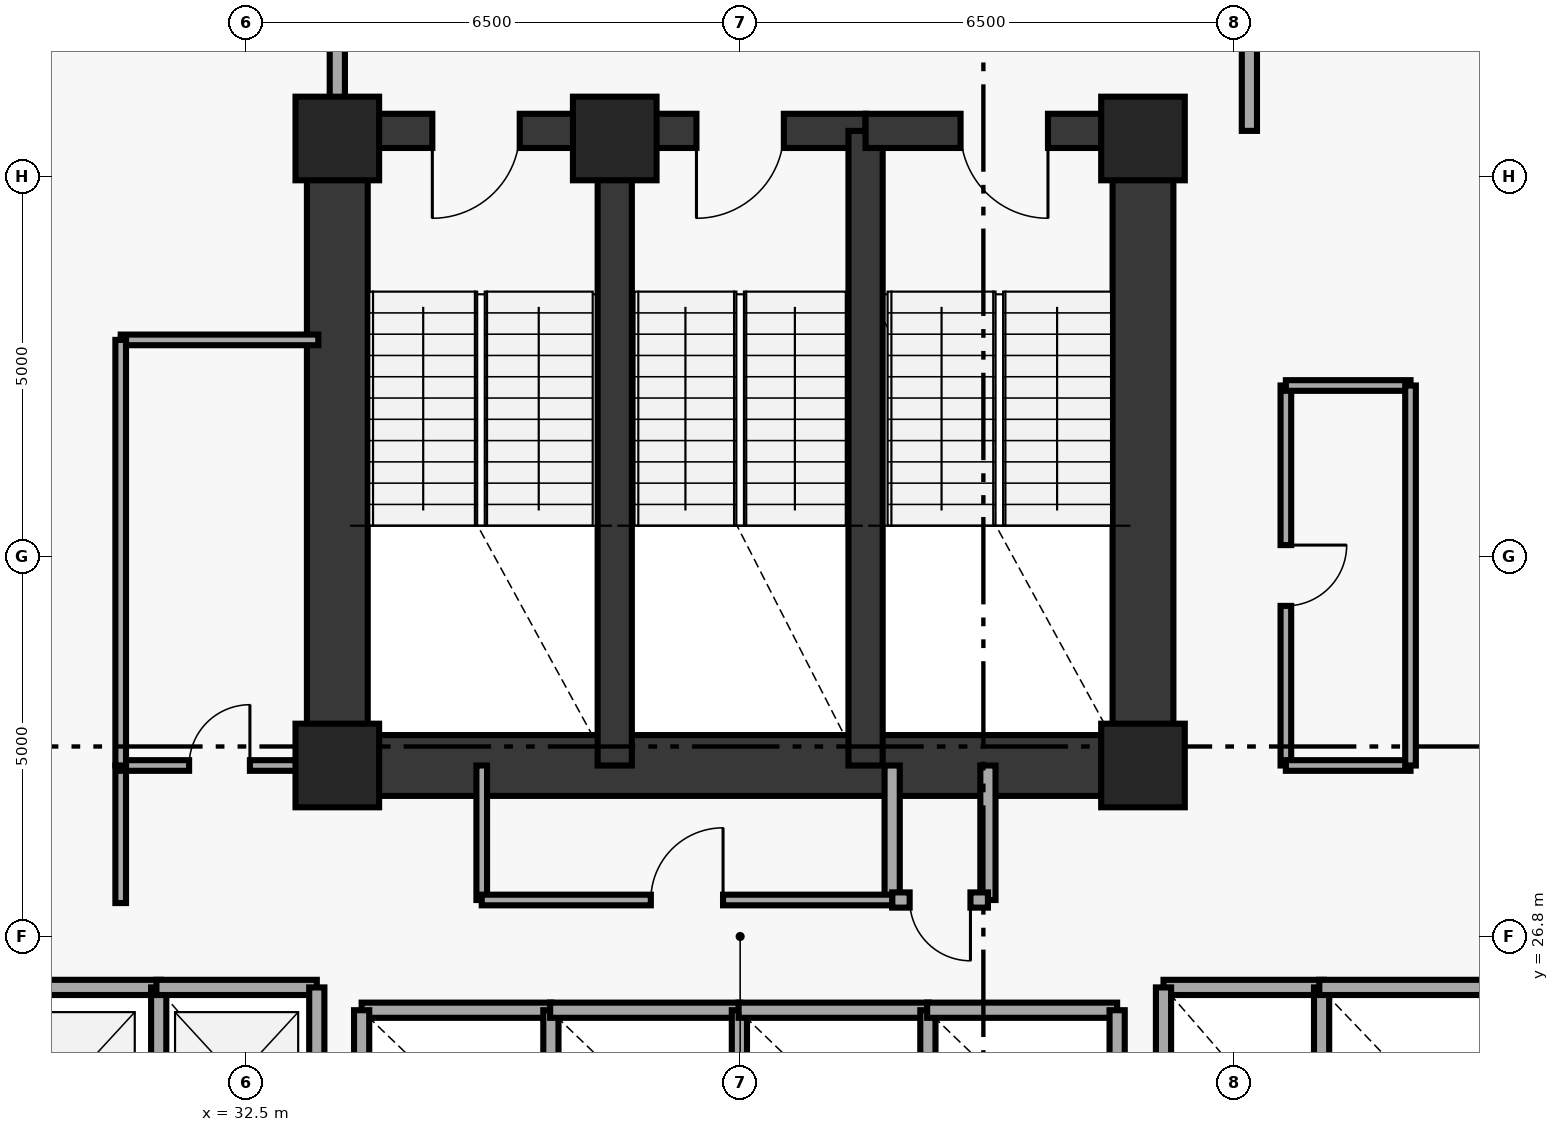
"""IFC4 building model, lengths in metres.
Left out: names, types, materials, properties, quantities, classifications, styles, units other than length and angle.
Written with IfcOpenShell. Run it as: python <this file> out.ifc"""

import sys

from ifc_helpers import new_model, si_unit, direction, frame, frame_2d, origin, origin_2d, place, context, subcontext, project, spatial, rectangle, extrude, element, fill, save


model = new_model("IFC4")
c1 = context("Model", 3, precision=1e-05, world=origin(), true_north=direction((0.0, 1.0)))
c2 = subcontext(c1, "Body", "Model", "MODEL_VIEW")
j1 = project(units=[si_unit("LENGTHUNIT", "METRE"), si_unit("PLANEANGLEUNIT", "RADIAN")], contexts=[c1])
p1 = place(None, origin())
s1 = spatial("IfcSite", under=j1, at=p1, CompositionType="ELEMENT")
p2 = place(p1, origin())
s2 = spatial("IfcBuilding", under=s1, at=p2, CompositionType="ELEMENT")
p3 = place(p2, frame((0.0, 0.0, 53.4)))
s3 = spatial("IfcBuildingStorey", under=s2, at=p3, CompositionType="ELEMENT", Elevation=53.4)
for number, where, z_axis, x_axis in (
    (1, (44.3, 29.05, 0.0), (0.0, 0.0, 1.0), (1.0, 0.0, 0.0)),
    (2, (44.3, 37.3, 0.0), (0.0, 0.0, 1.0), (1.0, 0.0, 0.0)),
    (3, (37.35, 37.3, 0.0), (0.0, 0.0, 1.0), (1.0, 0.0, 0.0)),
    (4, (33.7, 37.3, 0.0), (0.0, 0.0, 1.0), (1.0, 0.0, 0.0)),
    (5, (33.7, 29.05, 0.0), (0.0, 0.0, 1.0), (1.0, 0.0, 0.0)),
):
    element("IfcColumn", number, at=place(p3, frame(where, z_axis=z_axis, x_axis=x_axis)), inside=s3, PredefinedType="PILASTER", context=c2, shape_type="SweptSolid", body=[
        extrude(rectangle(XDim=1.1, YDim=1.1, at=origin_2d()), origin(), (0.0, 0.0, 1.0), 3.8),
    ])
for number, where, z_axis, x_axis in (
    (6, (33.7, 29.05, 0.0), (0.0, 0.0, 1.0), (0.0, 1.0, 0.0)),
    (7, (44.3, 29.05, 0.0), (0.0, 0.0, 1.0), (0.0, 1.0, 0.0)),
):
    element("IfcWall", number, at=place(p3, frame(where, z_axis=z_axis, x_axis=x_axis)), inside=s3, PredefinedType="SHEAR", context=c2, shape_type="SweptSolid", body=[
        extrude(rectangle(XDim=8.35, YDim=0.8, at=frame_2d((4.175, 0.0))), origin(), (0.0, 0.0, 1.0), 3.8),
    ])
p4 = place(p3, frame((33.7, 29.05, 0.0), z_axis=(0.0, 0.0, 1.0), x_axis=(1.0, 0.0, 0.0)))
e8 = element("IfcWall", 8, at=p4, inside=s3, PredefinedType="SHEAR", context=c2, shape_type="SweptSolid", body=[
    extrude(rectangle(XDim=10.6, YDim=0.8, at=frame_2d((5.3, 0.0))), origin(), (0.0, 0.0, 1.0), 3.8),
])
p5 = place(p3, frame((37.35, 37.4, 0.0), z_axis=(0.0, 0.0, 1.0), x_axis=(-1.0, 0.0, 0.0)))
e9 = element("IfcWall", 9, at=p5, inside=s3, PredefinedType="SHEAR", context=c2, shape_type="SweptSolid", body=[
    extrude(rectangle(XDim=3.65, YDim=0.45, at=frame_2d((1.825, 0.0))), origin(), (0.0, 0.0, 1.0), 3.8),
])
p6 = place(p5, frame((1.25, 0.0, 0.0)))
e10 = element("IfcOpeningElement", 10, at=p6, cuts=e9, PredefinedType="OPENING", context=c2, shape_type="SweptSolid", body=[
    extrude(rectangle(XDim=1.15, YDim=2.15, at=frame_2d((0.575, 1.075))), frame((0.0, 0.235, 0.0), z_axis=(0.0, -1.0, 0.0), x_axis=(1.0, 0.0, 0.0)), (0.0, 0.0, 1.0), 0.47),
])
p7 = place(p3, frame((37.35, 29.05, 0.0), z_axis=(0.0, 0.0, 1.0), x_axis=(0.0, 1.0, 0.0)))
e11 = element("IfcWall", 11, at=p7, inside=s3, PredefinedType="SHEAR", context=c2, shape_type="SweptSolid", body=[
    extrude(rectangle(XDim=8.35, YDim=0.45, at=frame_2d((4.175, 0.0))), origin(), (0.0, 0.0, 1.0), 3.8),
])
p8 = place(p3, frame((40.65, 37.4, 0.0), z_axis=(0.0, 0.0, 1.0), x_axis=(-1.0, 0.0, 0.0)))
e12 = element("IfcWall", 12, at=p8, inside=s3, PredefinedType="SHEAR", context=c2, shape_type="SweptSolid", body=[
    extrude(rectangle(XDim=3.3, YDim=0.45, at=frame_2d((1.65, 0.0))), origin(), (0.0, 0.0, 1.0), 3.8),
])
p9 = place(p8, frame((1.075, 0.0, 0.0)))
e13 = element("IfcOpeningElement", 13, at=p9, cuts=e12, PredefinedType="OPENING", context=c2, shape_type="SweptSolid", body=[
    extrude(rectangle(XDim=1.15, YDim=2.15, at=frame_2d((0.575, 1.075))), frame((0.0, 0.235, 0.0), z_axis=(0.0, -1.0, 0.0), x_axis=(1.0, 0.0, 0.0)), (0.0, 0.0, 1.0), 0.47),
])
p10 = place(p3, frame((40.65, 29.05, 0.0), z_axis=(0.0, 0.0, 1.0), x_axis=(0.0, 1.0, 0.0)))
e14 = element("IfcWall", 14, at=p10, inside=s3, PredefinedType="SHEAR", context=c2, shape_type="SweptSolid", body=[
    extrude(rectangle(XDim=8.35, YDim=0.45, at=frame_2d((4.175, 0.0))), origin(), (0.0, 0.0, 1.0), 3.8),
])
p11 = place(p3, frame((44.3, 37.4, 0.0), z_axis=(0.0, 0.0, 1.0), x_axis=(-1.0, 0.0, 0.0)))
e15 = element("IfcWall", 15, at=p11, inside=s3, PredefinedType="SHEAR", context=c2, shape_type="SweptSolid", body=[
    extrude(rectangle(XDim=3.65, YDim=0.45, at=frame_2d((1.825, 0.0))), origin(), (0.0, 0.0, 1.0), 3.8),
])
p12 = place(p11, frame((1.25, 0.0, 0.0)))
e16 = element("IfcOpeningElement", 16, at=p12, cuts=e15, PredefinedType="OPENING", context=c2, shape_type="SweptSolid", body=[
    extrude(rectangle(XDim=1.15, YDim=2.15, at=frame_2d((0.575, 1.075))), frame((0.0, 0.235, 0.0), z_axis=(0.0, -1.0, 0.0), x_axis=(1.0, 0.0, 0.0)), (0.0, 0.0, 1.0), 0.47),
])
for number, where, z_axis, x_axis in (
    (17, (33.7, 37.4, 0.0), (0.0, 0.0, 1.0), (0.0, 1.0, 0.0)),
    (18, (45.7, 37.4, 0.0), (0.0, 0.0, 1.0), (0.0, 1.0, 0.0)),
):
    element("IfcWall", number, at=place(p3, frame(where, z_axis=z_axis, x_axis=x_axis)), inside=s3, PredefinedType="SOLIDWALL", context=c2, shape_type="SweptSolid", body=[
        extrude(rectangle(XDim=1.88, YDim=0.2, at=frame_2d((0.94, 0.0))), origin(), (0.0, 0.0, 1.0), 3.8),
    ])
p13 = place(p3, frame((35.6, 27.28, 0.0), z_axis=(0.0, 0.0, 1.0), x_axis=(0.0, 1.0, 0.0)))
e19 = element("IfcWall", 19, at=p13, inside=s3, PredefinedType="PARTITIONING", context=c2, shape_type="SweptSolid", body=[
    extrude(rectangle(XDim=1.77, YDim=0.14, at=frame_2d((0.885, 0.0))), origin(), (0.0, 0.0, 1.0), 3.8),
])
for number, where, z_axis, x_axis in (
    (20, (41.0, 27.28, 0.0), (0.0, 0.0, 1.0), (0.0, 1.0, 0.0)),
    (21, (42.26, 27.28, 0.0), (0.0, 0.0, 1.0), (0.0, 1.0, 0.0)),
):
    element("IfcWall", number, at=place(p3, frame(where, z_axis=z_axis, x_axis=x_axis)), inside=s3, PredefinedType="SOLIDWALL", context=c2, shape_type="SweptSolid", body=[
        extrude(rectangle(XDim=1.77, YDim=0.2, at=frame_2d((0.885, 0.0))), origin(), (0.0, 0.0, 1.0), 3.8),
    ])
p14 = place(p3, frame((41.0, 27.28, 0.0), z_axis=(0.0, 0.0, 1.0), x_axis=(1.0, 0.0, 0.0)))
e22 = element("IfcWall", 22, at=p14, inside=s3, PredefinedType="SOLIDWALL", context=c2, shape_type="SweptSolid", body=[
    extrude(rectangle(XDim=1.26, YDim=0.2, at=frame_2d((0.63, 0.0))), origin(), (0.0, 0.0, 1.0), 3.8),
])
p15 = place(p14, frame((0.23, 0.0, 0.0)))
e23 = element("IfcOpeningElement", 23, at=p15, cuts=e22, PredefinedType="OPENING", context=c2, shape_type="SweptSolid", body=[
    extrude(rectangle(XDim=0.8, YDim=2.05, at=frame_2d((0.4, 1.025))), frame((0.0, 0.11, 0.0), z_axis=(0.0, -1.0, 0.0), x_axis=(1.0, 0.0, 0.0)), (0.0, 0.0, 1.0), 0.22),
])
p16 = place(p3, frame((29.07, 26.13, 0.0), z_axis=(0.0, 0.0, 1.0), x_axis=(1.0, 0.0, 0.0)))
e24 = element("IfcWall", 24, at=p16, inside=s3, PredefinedType="SOLIDWALL", context=c2, shape_type="SweptSolid", body=[
    extrude(rectangle(XDim=2.31, YDim=0.2, at=frame_2d((1.155, 0.0))), origin(), (0.0, 0.0, 1.0), 3.8),
])
p17 = place(p3, frame((31.35, 23.72, 0.0), z_axis=(0.0, 0.0, 1.0), x_axis=(0.0, 1.0, 0.0)))
e25 = element("IfcWall", 25, at=p17, inside=s3, PredefinedType="SOLIDWALL", context=c2, shape_type="SweptSolid", body=[
    extrude(rectangle(XDim=2.41, YDim=0.2, at=frame_2d((1.205, 0.0))), origin(), (0.0, 0.0, 1.0), 3.8),
])
p18 = place(p3, frame((31.32, 26.13, 0.0), z_axis=(0.0, 0.0, 1.0), x_axis=(1.0, 0.0, 0.0)))
e26 = element("IfcWall", 26, at=p18, inside=s3, PredefinedType="SOLIDWALL", context=c2, shape_type="SweptSolid", body=[
    extrude(rectangle(XDim=2.11, YDim=0.2, at=frame_2d((1.055, 0.0))), origin(), (0.0, 0.0, 1.0), 3.8),
])
p19 = place(p3, frame((33.43, 23.72, 0.0), z_axis=(0.0, 0.0, 1.0), x_axis=(0.0, 1.0, 0.0)))
e27 = element("IfcWall", 27, at=p19, inside=s3, PredefinedType="SOLIDWALL", context=c2, shape_type="SweptSolid", body=[
    extrude(rectangle(XDim=2.41, YDim=0.2, at=frame_2d((1.205, 0.0))), origin(), (0.0, 0.0, 1.0), 3.8),
])
p20 = place(p3, frame((44.57, 26.13, 0.0), z_axis=(0.0, 0.0, 1.0), x_axis=(1.0, 0.0, 0.0)))
e28 = element("IfcWall", 28, at=p20, inside=s3, PredefinedType="SOLIDWALL", context=c2, shape_type="SweptSolid", body=[
    extrude(rectangle(XDim=2.11, YDim=0.2, at=frame_2d((1.055, 0.0))), origin(), (0.0, 0.0, 1.0), 3.8),
])
for number, where, z_axis, x_axis in (
    (29, (44.57, 23.72, 0.0), (0.0, 0.0, 1.0), (0.0, 1.0, 0.0)),
    (30, (46.65, 23.72, 0.0), (0.0, 0.0, 1.0), (0.0, 1.0, 0.0)),
):
    element("IfcWall", number, at=place(p3, frame(where, z_axis=z_axis, x_axis=x_axis)), inside=s3, PredefinedType="SOLIDWALL", context=c2, shape_type="SweptSolid", body=[
        extrude(rectangle(XDim=2.41, YDim=0.2, at=frame_2d((1.205, 0.0))), origin(), (0.0, 0.0, 1.0), 3.8),
    ])
p21 = place(p3, frame((46.62, 26.13, 0.0), z_axis=(0.0, 0.0, 1.0), x_axis=(1.0, 0.0, 0.0)))
e31 = element("IfcWall", 31, at=p21, inside=s3, PredefinedType="SOLIDWALL", context=c2, shape_type="SweptSolid", body=[
    extrude(rectangle(XDim=2.31, YDim=0.2, at=frame_2d((1.155, 0.0))), origin(), (0.0, 0.0, 1.0), 3.8),
])
p22 = place(p3, frame((34.02, 25.83, 0.0), z_axis=(0.0, 0.0, 1.0), x_axis=(1.0, 0.0, 0.0)))
e32 = element("IfcWall", 32, at=p22, inside=s3, PredefinedType="SOLIDWALL", context=c2, shape_type="SweptSolid", body=[
    extrude(rectangle(XDim=2.5, YDim=0.2, at=frame_2d((1.25, 0.0))), origin(), (0.0, 0.0, 1.0), 3.8),
])
for number, where, z_axis, x_axis in (
    (33, (34.02, 23.42, 0.0), (0.0, 0.0, 1.0), (0.0, 1.0, 0.0)),
    (34, (36.51, 23.42, 0.0), (0.0, 0.0, 1.0), (0.0, 1.0, 0.0)),
):
    element("IfcWall", number, at=place(p3, frame(where, z_axis=z_axis, x_axis=x_axis)), inside=s3, PredefinedType="SOLIDWALL", context=c2, shape_type="SweptSolid", body=[
        extrude(rectangle(XDim=2.41, YDim=0.2, at=frame_2d((1.205, 0.0))), origin(), (0.0, 0.0, 1.0), 3.8),
    ])
p23 = place(p3, frame((36.5, 25.83, 0.0), z_axis=(0.0, 0.0, 1.0), x_axis=(1.0, 0.0, 0.0)))
e35 = element("IfcWall", 35, at=p23, inside=s3, PredefinedType="SOLIDWALL", context=c2, shape_type="SweptSolid", body=[
    extrude(rectangle(XDim=2.5, YDim=0.2, at=frame_2d((1.25, 0.0))), origin(), (0.0, 0.0, 1.0), 3.8),
])
p24 = place(p3, frame((38.99, 23.42, 0.0), z_axis=(0.0, 0.0, 1.0), x_axis=(0.0, 1.0, 0.0)))
e36 = element("IfcWall", 36, at=p24, inside=s3, PredefinedType="SOLIDWALL", context=c2, shape_type="SweptSolid", body=[
    extrude(rectangle(XDim=2.41, YDim=0.2, at=frame_2d((1.205, 0.0))), origin(), (0.0, 0.0, 1.0), 3.8),
])
p25 = place(p3, frame((38.98, 25.83, 0.0), z_axis=(0.0, 0.0, 1.0), x_axis=(1.0, 0.0, 0.0)))
e37 = element("IfcWall", 37, at=p25, inside=s3, PredefinedType="SOLIDWALL", context=c2, shape_type="SweptSolid", body=[
    extrude(rectangle(XDim=2.5, YDim=0.2, at=frame_2d((1.25, 0.0))), origin(), (0.0, 0.0, 1.0), 3.8),
])
p26 = place(p3, frame((41.47, 23.42, 0.0), z_axis=(0.0, 0.0, 1.0), x_axis=(0.0, 1.0, 0.0)))
e38 = element("IfcWall", 38, at=p26, inside=s3, PredefinedType="SOLIDWALL", context=c2, shape_type="SweptSolid", body=[
    extrude(rectangle(XDim=2.41, YDim=0.2, at=frame_2d((1.205, 0.0))), origin(), (0.0, 0.0, 1.0), 3.8),
])
p27 = place(p3, frame((41.46, 25.83, 0.0), z_axis=(0.0, 0.0, 1.0), x_axis=(1.0, 0.0, 0.0)))
e39 = element("IfcWall", 39, at=p27, inside=s3, PredefinedType="SOLIDWALL", context=c2, shape_type="SweptSolid", body=[
    extrude(rectangle(XDim=2.5, YDim=0.2, at=frame_2d((1.25, 0.0))), origin(), (0.0, 0.0, 1.0), 3.8),
])
p28 = place(p3, frame((43.96, 23.42, 0.0), z_axis=(0.0, 0.0, 1.0), x_axis=(0.0, 1.0, 0.0)))
e40 = element("IfcWall", 40, at=p28, inside=s3, PredefinedType="SOLIDWALL", context=c2, shape_type="SweptSolid", body=[
    extrude(rectangle(XDim=2.41, YDim=0.2, at=frame_2d((1.205, 0.0))), origin(), (0.0, 0.0, 1.0), 3.8),
])
p29 = place(p3, frame((35.6, 27.28, 0.0), z_axis=(0.0, 0.0, 1.0), x_axis=(1.0, 0.0, 0.0)))
e41 = element("IfcWall", 41, at=p29, inside=s3, PredefinedType="PARTITIONING", context=c2, shape_type="SweptSolid", body=[
    extrude(rectangle(XDim=5.4, YDim=0.14, at=frame_2d((2.7, 0.0))), origin(), (0.0, 0.0, 1.0), 3.8),
])
p30 = place(p29, frame((2.225, 0.0, 0.0)))
e42 = element("IfcOpeningElement", 42, at=p30, cuts=e41, PredefinedType="OPENING", context=c2, shape_type="SweptSolid", body=[
    extrude(rectangle(XDim=0.95, YDim=2.1, at=frame_2d((0.475, 1.05))), frame((0.0, 0.08, 0.0), z_axis=(0.0, -1.0, 0.0), x_axis=(1.0, 0.0, 0.0)), (0.0, 0.0, 1.0), 0.16),
])
p31 = place(p3, frame((30.85, 27.24, 0.0), z_axis=(0.0, 0.0, 1.0), x_axis=(0.0, 1.0, 0.0)))
e43 = element("IfcWall", 43, at=p31, inside=s3, PredefinedType="PARTITIONING", context=c2, shape_type="SweptSolid", body=[
    extrude(rectangle(XDim=1.81, YDim=0.14, at=frame_2d((0.905, 0.0))), origin(), (0.0, 0.0, 1.0), 3.8),
])
p32 = place(p3, frame((30.85, 29.05, 0.0), z_axis=(0.0, 0.0, 1.0), x_axis=(1.0, 0.0, 0.0)))
e44 = element("IfcWall", 44, at=p32, inside=s3, PredefinedType="PARTITIONING", context=c2, shape_type="SweptSolid", body=[
    extrude(rectangle(XDim=2.6, YDim=0.14, at=frame_2d((1.3, 0.0))), origin(), (0.0, 0.0, 1.0), 2.79),
])
p33 = place(p32, frame((0.9, 0.0, 0.0)))
e45 = element("IfcOpeningElement", 45, at=p33, cuts=e44, PredefinedType="OPENING", context=c2, shape_type="SweptSolid", body=[
    extrude(rectangle(XDim=0.8, YDim=2.05, at=frame_2d((0.4, 1.025))), frame((0.0, 0.08, 0.0), z_axis=(0.0, -1.0, 0.0), x_axis=(1.0, 0.0, 0.0)), (0.0, 0.0, 1.0), 0.16),
])
p34 = place(p3, frame((30.85, 34.65, 0.0), z_axis=(0.0, 0.0, 1.0), x_axis=(1.0, 0.0, 0.0)))
e46 = element("IfcWall", 46, at=p34, inside=s3, PredefinedType="PARTITIONING", context=c2, shape_type="SweptSolid", body=[
    extrude(rectangle(XDim=2.6, YDim=0.14, at=frame_2d((1.3, 0.0))), origin(), (0.0, 0.0, 1.0), 3.8),
])
p35 = place(p3, frame((30.85, 29.05, 0.0), z_axis=(0.0, 0.0, 1.0), x_axis=(0.0, 1.0, 0.0)))
e47 = element("IfcWall", 47, at=p35, inside=s3, PredefinedType="PARTITIONING", context=c2, shape_type="SweptSolid", body=[
    extrude(rectangle(XDim=5.6, YDim=0.14, at=frame_2d((2.8, 0.0))), origin(), (0.0, 0.0, 1.0), 3.8),
])
p36 = place(p3, frame((46.18, 34.05, 0.0), z_axis=(0.0, 0.0, 1.0), x_axis=(0.0, -1.0, 0.0)))
e48 = element("IfcWall", 48, at=p36, inside=s3, PredefinedType="PARTITIONING", context=c2, shape_type="SweptSolid", body=[
    extrude(rectangle(XDim=5.0, YDim=0.14, at=frame_2d((2.5, 0.0))), origin(), (0.0, 0.0, 1.0), 3.8),
])
p37 = place(p36, frame((2.1, 0.0, 0.0)))
e49 = element("IfcOpeningElement", 49, at=p37, cuts=e48, PredefinedType="OPENING", context=c2, shape_type="SweptSolid", body=[
    extrude(rectangle(XDim=0.8, YDim=2.05, at=frame_2d((0.4, 1.025))), frame((0.0, 0.08, 0.0), z_axis=(0.0, -1.0, 0.0), x_axis=(1.0, 0.0, 0.0)), (0.0, 0.0, 1.0), 0.16),
])
for number, where, z_axis, x_axis in (
    (50, (46.18, 29.05, 0.0), (0.0, 0.0, 1.0), (1.0, 0.0, 0.0)),
    (51, (46.18, 34.05, 0.0), (0.0, 0.0, 1.0), (1.0, 0.0, 0.0)),
):
    element("IfcWall", number, at=place(p3, frame(where, z_axis=z_axis, x_axis=x_axis)), inside=s3, PredefinedType="PARTITIONING", context=c2, shape_type="SweptSolid", body=[
        extrude(rectangle(XDim=1.64, YDim=0.14, at=frame_2d((0.82, 0.0))), origin(), (0.0, 0.0, 1.0), 3.8),
    ])
p38 = place(p3, frame((47.82, 29.05, 0.0), z_axis=(0.0, 0.0, 1.0), x_axis=(0.0, 1.0, 0.0)))
e52 = element("IfcWall", 52, at=p38, inside=s3, PredefinedType="PARTITIONING", context=c2, shape_type="SweptSolid", body=[
    extrude(rectangle(XDim=5.0, YDim=0.14, at=frame_2d((2.5, 0.0))), origin(), (0.0, 0.0, 1.0), 3.8),
])
p39 = place(p3, frame((35.348, 42.608, 0.0), z_axis=(0.0, 0.0, 1.0), x_axis=(-0.807666592587, -0.589639445101, 0.0)))
e53 = element("IfcWall", 53, at=p39, inside=s3, PredefinedType="PARTITIONING", context=c2, shape_type="SweptSolid", body=[
    extrude(rectangle(XDim=7.581, YDim=0.16, at=frame_2d((3.791, 0.0))), origin(), (0.0, 0.0, 1.0), 3.8),
])
p40 = place(p6, origin())
e54 = element("IfcDoor", 54, at=p40, inside=s3, OperationType="SINGLE_SWING_RIGHT", PredefinedType="DOOR", context=c2, shape_type="SweptSolid", body=[
    extrude(rectangle(XDim=1.15, YDim=2.15, at=frame_2d((0.575, 1.075))), frame((0.0, 0.025, 0.0), z_axis=(0.0, -1.0, 0.0), x_axis=(1.0, 0.0, 0.0)), (0.0, 0.0, 1.0), 0.05),
])
fill(e10, e54)
p41 = place(p9, origin())
e55 = element("IfcDoor", 55, at=p41, inside=s3, OperationType="SINGLE_SWING_RIGHT", PredefinedType="DOOR", context=c2, shape_type="SweptSolid", body=[
    extrude(rectangle(XDim=1.15, YDim=2.15, at=frame_2d((0.575, 1.075))), frame((0.0, 0.025, 0.0), z_axis=(0.0, -1.0, 0.0), x_axis=(1.0, 0.0, 0.0)), (0.0, 0.0, 1.0), 0.05),
])
fill(e13, e55)
p42 = place(p12, origin())
e56 = element("IfcDoor", 56, at=p42, inside=s3, OperationType="SINGLE_SWING_LEFT", PredefinedType="DOOR", context=c2, shape_type="SweptSolid", body=[
    extrude(rectangle(XDim=1.15, YDim=2.15, at=frame_2d((0.575, 1.075))), frame((0.0, 0.025, 0.0), z_axis=(0.0, -1.0, 0.0), x_axis=(1.0, 0.0, 0.0)), (0.0, 0.0, 1.0), 0.05),
])
fill(e16, e56)
p43 = place(p15, origin())
e57 = element("IfcDoor", 57, at=p43, inside=s3, OperationType="SINGLE_SWING_RIGHT", PredefinedType="DOOR", context=c2, shape_type="SweptSolid", body=[
    extrude(rectangle(XDim=0.8, YDim=2.05, at=frame_2d((0.4, 1.025))), frame((0.0, 0.025, 0.0), z_axis=(0.0, -1.0, 0.0), x_axis=(1.0, 0.0, 0.0)), (0.0, 0.0, 1.0), 0.05),
])
fill(e23, e57)
p44 = place(p30, origin())
e58 = element("IfcDoor", 58, at=p44, inside=s3, OperationType="SINGLE_SWING_RIGHT", PredefinedType="DOOR", context=c2, shape_type="SweptSolid", body=[
    extrude(rectangle(XDim=0.95, YDim=2.1, at=frame_2d((0.475, 1.05))), frame((0.0, 0.025, 0.0), z_axis=(0.0, -1.0, 0.0), x_axis=(1.0, 0.0, 0.0)), (0.0, 0.0, 1.0), 0.05),
])
fill(e42, e58)
p45 = place(p33, origin())
e59 = element("IfcDoor", 59, at=p45, inside=s3, OperationType="SINGLE_SWING_RIGHT", PredefinedType="DOOR", context=c2, shape_type="SweptSolid", body=[
    extrude(rectangle(XDim=0.8, YDim=2.05, at=frame_2d((0.4, 1.025))), frame((0.0, 0.025, 0.0), z_axis=(0.0, -1.0, 0.0), x_axis=(1.0, 0.0, 0.0)), (0.0, 0.0, 1.0), 0.05),
])
fill(e45, e59)
p46 = place(p37, origin())
e60 = element("IfcDoor", 60, at=p46, inside=s3, OperationType="SINGLE_SWING_LEFT", PredefinedType="DOOR", context=c2, shape_type="SweptSolid", body=[
    extrude(rectangle(XDim=0.8, YDim=2.05, at=frame_2d((0.4, 1.025))), frame((0.0, 0.025, 0.0), z_axis=(0.0, -1.0, 0.0), x_axis=(1.0, 0.0, 0.0)), (0.0, 0.0, 1.0), 0.05),
])
fill(e49, e60)
save(model, sys.argv[1])
